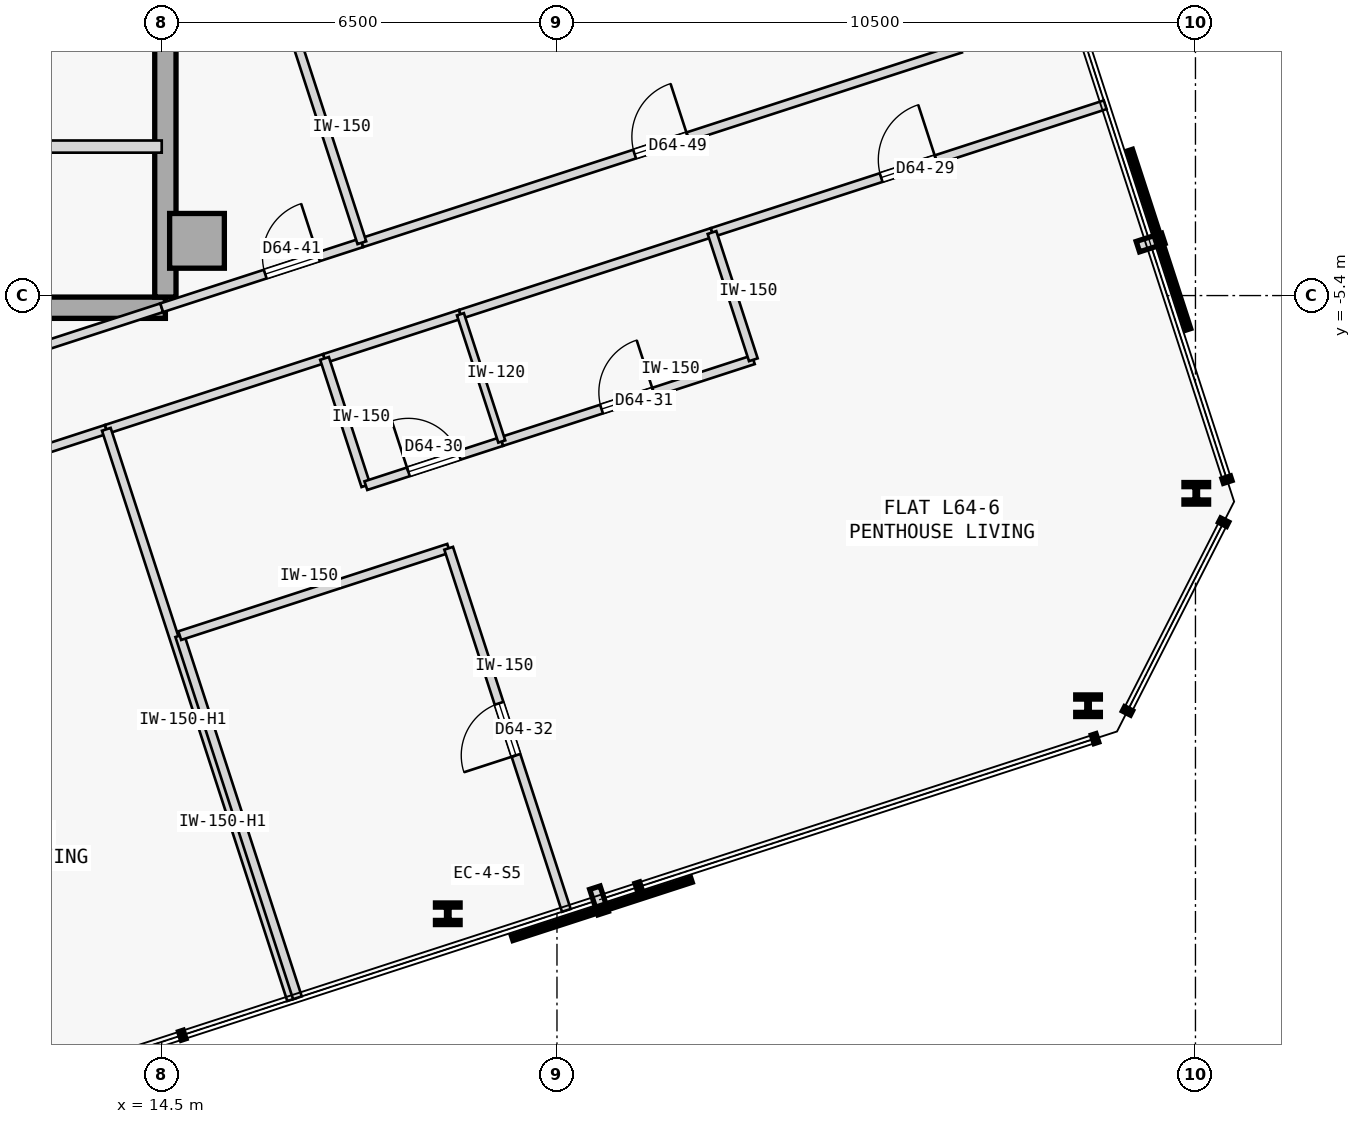
"""IFC4 building model, lengths in metres.
Left out: names, types, materials, properties, quantities, classifications, styles, units other than length and angle.
Written with IfcOpenShell. Run it as: python <this file> out.ifc"""

import sys

from ifc_helpers import new_model, si_unit, direction, frame, frame_2d, origin, origin_2d, place, context, subcontext, project, spatial, rectangle, i_section, extrude, element, fill, save


model = new_model("IFC4")
c1 = context("Model", 3, precision=1e-05, world=origin(), true_north=direction((0.0, 1.0)))
c2 = subcontext(c1, "Body", "Model", "MODEL_VIEW")
j1 = project(units=[si_unit("LENGTHUNIT", "METRE"), si_unit("PLANEANGLEUNIT", "RADIAN")], contexts=[c1])
p1 = place(None, origin())
s1 = spatial("IfcSite", under=j1, at=p1, CompositionType="ELEMENT")
p2 = place(p1, origin())
s2 = spatial("IfcBuilding", under=s1, at=p2, CompositionType="ELEMENT")
p3 = place(p2, frame((0.0, 0.0, 241.05)))
s3 = spatial("IfcBuildingStorey", under=s2, at=p3, CompositionType="ELEMENT", Elevation=241.05)
p4 = place(p3, frame((15.08, -4.5, 0.0), z_axis=(0.0, 0.0, 1.0), x_axis=(1.0, 0.0, 0.0)))
e1 = element("IfcColumn", 1, at=p4, inside=s3, PredefinedType="COLUMN", context=c2, shape_type="SweptSolid", body=[
    extrude(rectangle(XDim=0.9, YDim=0.9, at=origin_2d()), origin(), (0.0, 0.0, 1.0), 3.35),
])
p5 = place(p3, frame((3.7, -5.6, 0.0), z_axis=(0.0, 0.0, 1.0), x_axis=(1.0, 0.0, 0.0)))
e2 = element("IfcWall", 2, at=p5, inside=s3, PredefinedType="SHEAR", context=c2, shape_type="SweptSolid", body=[
    extrude(rectangle(XDim=10.86, YDim=0.35, at=frame_2d((5.43, 0.0))), origin(), (0.0, 0.0, 1.0), 3.125),
])
p6 = place(p3, frame((14.56, -5.425, 0.0), z_axis=(0.0, 0.0, 1.0), x_axis=(0.0, 1.0, 0.0)))
e3 = element("IfcWall", 3, at=p6, inside=s3, PredefinedType="SHEAR", context=c2, shape_type="SweptSolid", body=[
    extrude(rectangle(XDim=10.85, YDim=0.35, at=frame_2d((5.425, 0.0))), origin(), (0.0, 0.0, 1.0), 3.125),
])
for number, where, z_axis, x_axis in (
    (4, (19.204, -15.566, 0.0), (0.0, 0.0, 1.0), (1.0, 0.0, 0.0)),
    (5, (29.734, -12.145, 0.0), (0.0, 0.0, 1.0), (1.0, 0.0, 0.0)),
    (6, (31.513, -8.652, 0.0), (0.0, 0.0, 1.0), (1.0, 0.0, 0.0)),
):
    element("IfcColumn", number, at=place(p3, frame(where, z_axis=z_axis, x_axis=x_axis)), inside=s3, PredefinedType="COLUMN", context=c2, shape_type="SweptSolid", body=[
        extrude(i_section(OverallWidth=0.405, OverallDepth=0.355, WebThickness=0.042, FlangeThickness=0.068, FilletRadius=0.015, at=origin_2d()), origin(), (0.0, 0.0, 1.0), 3.35),
    ])
p7 = place(p3, frame((3.7, -2.95, 0.0), z_axis=(0.0, 0.0, 1.0), x_axis=(1.0, 0.0, 0.0)))
e7 = element("IfcWall", 7, at=p7, inside=s3, PredefinedType="STANDARD", context=c2, shape_type="SweptSolid", body=[
    extrude(rectangle(XDim=10.8, YDim=0.2, at=frame_2d((5.4, 0.0))), origin(), (0.0, 0.0, 1.0), 3.125),
])
p8 = place(p7, frame((0.53, 0.0, 0.0)))
e8 = element("IfcOpeningElement", 8, at=p8, cuts=e7, PredefinedType="OPENING", context=c2, shape_type="SweptSolid", body=[
    extrude(rectangle(XDim=1.1, YDim=2.15, at=frame_2d((0.55, 1.075))), frame((0.0, 0.11, 0.0), z_axis=(0.0, -1.0, 0.0), x_axis=(1.0, 0.0, 0.0)), (0.0, 0.0, 1.0), 0.22),
])
p9 = place(p7, frame((3.71, 0.0, 0.0)))
e9 = element("IfcOpeningElement", 9, at=p9, cuts=e7, PredefinedType="OPENING", context=c2, shape_type="SweptSolid", body=[
    extrude(rectangle(XDim=0.92, YDim=2.15, at=frame_2d((0.46, 1.075))), frame((0.0, 0.11, 0.0), z_axis=(0.0, -1.0, 0.0), x_axis=(1.0, 0.0, 0.0)), (0.0, 0.0, 1.0), 0.22),
])
p10 = place(p7, frame((8.03, 0.0, 0.0)))
e10 = element("IfcOpeningElement", 10, at=p10, cuts=e7, PredefinedType="OPENING", context=c2, shape_type="SweptSolid", body=[
    extrude(rectangle(XDim=0.92, YDim=2.15, at=frame_2d((0.46, 1.075))), frame((0.0, 0.11, 0.0), z_axis=(0.0, -1.0, 0.0), x_axis=(1.0, 0.0, 0.0)), (0.0, 0.0, 1.0), 0.22),
])
p11 = place(p3, frame((8.744, -9.174, 0.0), z_axis=(0.0, 0.0, 1.0), x_axis=(0.95105238152, 0.309029719615, 0.0)))
e11 = element("IfcWall", 11, at=p11, inside=s3, PredefinedType="PARTITIONING", context=c2, shape_type="SweptSolid", body=[
    extrude(rectangle(XDim=5.094, YDim=0.15, at=frame_2d((2.547, 0.0))), origin(), (0.0, 0.0, 1.0), 3.125),
])
p12 = place(p11, frame((2.072, 0.0, 0.0)))
e12 = element("IfcOpeningElement", 12, at=p12, cuts=e11, PredefinedType="OPENING", context=c2, shape_type="SweptSolid", body=[
    extrude(rectangle(XDim=0.95, YDim=2.15, at=frame_2d((0.475, 1.075))), frame((0.0, 0.085, 0.0), z_axis=(0.0, -1.0, 0.0), x_axis=(1.0, 0.0, 0.0)), (0.0, 0.0, 1.0), 0.17),
])
p13 = place(p3, frame((13.589, -7.6, 0.0), z_axis=(0.0, 0.0, 1.0), x_axis=(0.95105023481, 0.30903632613, 0.0)))
e13 = element("IfcWall", 13, at=p13, inside=s3, PredefinedType="PARTITIONING", context=c2, shape_type="SweptSolid", body=[
    extrude(rectangle(XDim=3.773, YDim=0.15, at=frame_2d((1.886, 0.0))), origin(), (0.0, 0.0, 1.0), 3.125),
])
p14 = place(p3, frame((23.549, -4.363, 0.0), z_axis=(0.0, 0.0, 1.0), x_axis=(0.951054649174, 0.309022740723, 0.0)))
e14 = element("IfcWall", 14, at=p14, inside=s3, PredefinedType="PARTITIONING", context=c2, shape_type="SweptSolid", body=[
    extrude(rectangle(XDim=6.799, YDim=0.15, at=frame_2d((3.399, 0.0))), origin(), (0.0, 0.0, 1.0), 3.125),
])
p15 = place(p14, frame((2.925, 0.0, 0.0)))
e15 = element("IfcOpeningElement", 15, at=p15, cuts=e14, PredefinedType="OPENING", context=c2, shape_type="SweptSolid", body=[
    extrude(rectangle(XDim=0.95, YDim=2.15, at=frame_2d((0.475, 1.075))), frame((0.0, 0.085, 0.0), z_axis=(0.0, -1.0, 0.0), x_axis=(1.0, 0.0, 0.0)), (0.0, 0.0, 1.0), 0.17),
])
p16 = place(p3, frame((17.177, -6.434, 0.0), z_axis=(0.0, 0.0, 1.0), x_axis=(0.951066131077, 0.308987401554, 0.0)))
e16 = element("IfcWall", 16, at=p16, inside=s3, PredefinedType="PARTITIONING", context=c2, shape_type="SweptSolid", body=[
    extrude(rectangle(XDim=2.35, YDim=0.15, at=frame_2d((1.175, 0.0))), origin(), (0.0, 0.0, 1.0), 3.125),
])
p17 = place(p3, frame((19.412, -5.708, 0.0), z_axis=(0.0, 0.0, 1.0), x_axis=(0.951057987102, 0.309012467661, 0.0)))
e17 = element("IfcWall", 17, at=p17, inside=s3, PredefinedType="PARTITIONING", context=c2, shape_type="SweptSolid", body=[
    extrude(rectangle(XDim=4.35, YDim=0.15, at=frame_2d((2.175, 0.0))), origin(), (0.0, 0.0, 1.0), 3.125),
])
p18 = place(p3, frame((7.588, -7.846, 0.0), z_axis=(0.0, 0.0, 1.0), x_axis=(0.951058013903, 0.309012385174, 0.0)))
e18 = element("IfcWall", 18, at=p18, inside=s3, PredefinedType="PARTITIONING", context=c2, shape_type="SweptSolid", body=[
    extrude(rectangle(XDim=7.267, YDim=0.15, at=frame_2d((3.634, 0.0))), origin(), (0.0, 0.0, 1.0), 3.125),
])
p19 = place(p18, frame((0.557, 0.0, 0.0)))
e19 = element("IfcOpeningElement", 19, at=p19, cuts=e18, PredefinedType="OPENING", context=c2, shape_type="SweptSolid", body=[
    extrude(rectangle(XDim=0.92, YDim=2.15, at=frame_2d((0.46, 1.075))), frame((0.0, 0.085, 0.0), z_axis=(0.0, -1.0, 0.0), x_axis=(1.0, 0.0, 0.0)), (0.0, 0.0, 1.0), 0.17),
])
p20 = place(p3, frame((14.5, -5.6, 0.0), z_axis=(0.0, 0.0, 1.0), x_axis=(0.951047546178, 0.309044600193, 0.0)))
e20 = element("IfcWall", 20, at=p20, inside=s3, PredefinedType="PARTITIONING", context=c2, shape_type="SweptSolid", body=[
    extrude(rectangle(XDim=3.461, YDim=0.15, at=frame_2d((1.73, 0.0))), origin(), (0.0, 0.0, 1.0), 3.125),
])
p21 = place(p20, frame((1.79, 0.0, 0.0)))
e21 = element("IfcOpeningElement", 21, at=p21, cuts=e20, PredefinedType="OPENING", context=c2, shape_type="SweptSolid", body=[
    extrude(rectangle(XDim=0.92, YDim=2.15, at=frame_2d((0.46, 1.075))), frame((0.0, 0.085, 0.0), z_axis=(0.0, -1.0, 0.0), x_axis=(1.0, 0.0, 0.0)), (0.0, 0.0, 1.0), 0.17),
])
p22 = place(p3, frame((17.791, -4.531, 0.0), z_axis=(0.0, 0.0, 1.0), x_axis=(0.951056769902, 0.309016213852, 0.0)))
e22 = element("IfcWall", 22, at=p22, inside=s3, PredefinedType="PARTITIONING", context=c2, shape_type="SweptSolid", body=[
    extrude(rectangle(XDim=10.352, YDim=0.15, at=frame_2d((5.176, 0.0))), origin(), (0.0, 0.0, 1.0), 3.125),
])
p23 = place(p22, frame((4.716, 0.0, 0.0)))
e23 = element("IfcOpeningElement", 23, at=p23, cuts=e22, PredefinedType="OPENING", context=c2, shape_type="SweptSolid", body=[
    extrude(rectangle(XDim=0.92, YDim=2.15, at=frame_2d((0.46, 1.075))), frame((0.0, 0.085, 0.0), z_axis=(0.0, -1.0, 0.0), x_axis=(1.0, 0.0, 0.0)), (0.0, 0.0, 1.0), 0.17),
])
p24 = place(p3, frame((16.636, -16.979, 0.0), z_axis=(0.0, 0.0, 1.0), x_axis=(-0.309022258842, 0.95105480575, 0.0)))
e24 = element("IfcWall", 24, at=p24, inside=s3, PredefinedType="PARTITIONING", context=c2, shape_type="SweptSolid", body=[
    extrude(rectangle(XDim=9.862, YDim=0.15, at=frame_2d((4.931, 0.0))), origin(), (0.0, 0.0, 1.0), 2.675),
])
p25 = place(p3, frame((17.857, -8.526, 0.0), z_axis=(0.0, 0.0, 1.0), x_axis=(-0.309060979314, 0.951042223598, 0.0)))
e25 = element("IfcWall", 25, at=p25, inside=s3, PredefinedType="PARTITIONING", context=c2, shape_type="SweptSolid", body=[
    extrude(rectangle(XDim=2.2, YDim=0.15, at=frame_2d((1.1, 0.0))), origin(), (0.0, 0.0, 1.0), 3.125),
])
p26 = place(p3, frame((17.857, -8.526, 0.0), z_axis=(0.0, 0.0, 1.0), x_axis=(0.951066131077, 0.308987401554, 0.0)))
e26 = element("IfcWall", 26, at=p26, inside=s3, PredefinedType="PARTITIONING", context=c2, shape_type="SweptSolid", body=[
    extrude(rectangle(XDim=2.35, YDim=0.15, at=frame_2d((1.175, 0.0))), origin(), (0.0, 0.0, 1.0), 3.125),
])
p27 = place(p26, frame((0.735, 0.0, 0.0)))
e27 = element("IfcOpeningElement", 27, at=p27, cuts=e26, PredefinedType="OPENING", context=c2, shape_type="SweptSolid", body=[
    extrude(rectangle(XDim=0.88, YDim=2.15, at=frame_2d((0.44, 1.075))), frame((0.0, 0.085, 0.0), z_axis=(0.0, -1.0, 0.0), x_axis=(1.0, 0.0, 0.0)), (0.0, 0.0, 1.0), 0.17),
])
p28 = place(p3, frame((20.092, -7.8, 0.0), z_axis=(0.0, 0.0, 1.0), x_axis=(0.951057987102, 0.309012467661, 0.0)))
e28 = element("IfcWall", 28, at=p28, inside=s3, PredefinedType="PARTITIONING", context=c2, shape_type="SweptSolid", body=[
    extrude(rectangle(XDim=4.35, YDim=0.15, at=frame_2d((2.175, 0.0))), origin(), (0.0, 0.0, 1.0), 3.125),
])
p29 = place(p28, frame((1.725, 0.0, 0.0)))
e29 = element("IfcOpeningElement", 29, at=p29, cuts=e28, PredefinedType="OPENING", context=c2, shape_type="SweptSolid", body=[
    extrude(rectangle(XDim=0.9, YDim=2.15, at=frame_2d((0.45, 1.075))), frame((0.0, 0.085, 0.0), z_axis=(0.0, -1.0, 0.0), x_axis=(1.0, 0.0, 0.0)), (0.0, 0.0, 1.0), 0.17),
])
p30 = place(p3, frame((24.229, -6.456, 0.0), z_axis=(0.0, 0.0, 1.0), x_axis=(-0.309060979314, 0.951042223598, 0.0)))
e30 = element("IfcWall", 30, at=p30, inside=s3, PredefinedType="PARTITIONING", context=c2, shape_type="SweptSolid", body=[
    extrude(rectangle(XDim=2.2, YDim=0.15, at=frame_2d((1.1, 0.0))), origin(), (0.0, 0.0, 1.0), 3.125),
])
p31 = place(p3, frame((16.731, -16.948, 0.0), z_axis=(0.0, 0.0, 1.0), x_axis=(-0.309013782848, 0.951057559777, 0.0)))
e31 = element("IfcWall", 31, at=p31, inside=s3, PredefinedType="PARTITIONING", context=c2, shape_type="SweptSolid", body=[
    extrude(rectangle(XDim=6.262, YDim=0.15, at=frame_2d((3.131, 0.0))), origin(), (0.0, 0.0, 1.0), 2.675),
])
p32 = place(p3, frame((14.796, -10.992, 0.0), z_axis=(0.0, 0.0, 1.0), x_axis=(0.951070715387, 0.308973290646, 0.0)))
e32 = element("IfcWall", 32, at=p32, inside=s3, PredefinedType="PARTITIONING", context=c2, shape_type="SweptSolid", body=[
    extrude(rectangle(XDim=4.65, YDim=0.15, at=frame_2d((2.325, 0.0))), origin(), (0.0, 0.0, 1.0), 3.125),
])
p33 = place(p3, frame((21.154, -15.511, 0.0), z_axis=(0.0, 0.0, 1.0), x_axis=(-0.30902524124, 0.951053836687, 0.0)))
e33 = element("IfcWall", 33, at=p33, inside=s3, PredefinedType="PARTITIONING", context=c2, shape_type="SweptSolid", body=[
    extrude(rectangle(XDim=6.262, YDim=0.15, at=frame_2d((3.131, 0.0))), origin(), (0.0, 0.0, 1.0), 3.125),
])
p34 = place(p33, frame((2.681, 0.0, 0.0)))
e34 = element("IfcOpeningElement", 34, at=p34, cuts=e33, PredefinedType="OPENING", context=c2, shape_type="SweptSolid", body=[
    extrude(rectangle(XDim=0.9, YDim=2.15, at=frame_2d((0.45, 1.075))), frame((0.0, 0.085, 0.0), z_axis=(0.0, -1.0, 0.0), x_axis=(1.0, 0.0, 0.0)), (0.0, 0.0, 1.0), 0.17),
])
p35 = place(p3, frame((20.092, -7.8, 0.0), z_axis=(0.0, 0.0, 1.0), x_axis=(-0.309060979314, 0.951042223598, 0.0)))
e35 = element("IfcWall", 35, at=p35, inside=s3, PredefinedType="PARTITIONING", context=c2, shape_type="SweptSolid", body=[
    extrude(rectangle(XDim=2.2, YDim=0.12, at=frame_2d((1.1, 0.0))), origin(), (0.0, 0.0, 1.0), 3.125),
])
p36 = place(p3, frame((17.791, -4.531, 0.0), z_axis=(0.0, 0.0, 1.0), x_axis=(-0.309018414265, 0.951056054944, 0.0)))
e36 = element("IfcWall", 36, at=p36, inside=s3, PredefinedType="PARTITIONING", context=c2, shape_type="SweptSolid", body=[
    extrude(rectangle(XDim=3.835, YDim=0.15, at=frame_2d((1.917, 0.0))), origin(), (0.0, 0.0, 1.0), 3.125),
])
p37 = place(p15, origin())
e37 = element("IfcDoor", 37, at=p37, inside=s3, OperationType="SINGLE_SWING_RIGHT", PredefinedType="DOOR", context=c2, shape_type="SweptSolid", body=[
    extrude(rectangle(XDim=0.95, YDim=2.15, at=frame_2d((0.475, 1.075))), frame((0.0, 0.025, 0.0), z_axis=(0.0, -1.0, 0.0), x_axis=(1.0, 0.0, 0.0)), (0.0, 0.0, 1.0), 0.05),
])
fill(e15, e37)
p38 = place(p27, origin())
e38 = element("IfcDoor", 38, at=p38, inside=s3, OperationType="SINGLE_SWING_LEFT", PredefinedType="DOOR", context=c2, shape_type="SweptSolid", body=[
    extrude(rectangle(XDim=0.88, YDim=2.15, at=frame_2d((0.44, 1.075))), frame((0.0, 0.025, 0.0), z_axis=(0.0, -1.0, 0.0), x_axis=(1.0, 0.0, 0.0)), (0.0, 0.0, 1.0), 0.05),
])
fill(e27, e38)
p39 = place(p29, origin())
e39 = element("IfcDoor", 39, at=p39, inside=s3, OperationType="SINGLE_SWING_RIGHT", PredefinedType="DOOR", context=c2, shape_type="SweptSolid", body=[
    extrude(rectangle(XDim=0.9, YDim=2.15, at=frame_2d((0.45, 1.075))), frame((0.0, 0.025, 0.0), z_axis=(0.0, -1.0, 0.0), x_axis=(1.0, 0.0, 0.0)), (0.0, 0.0, 1.0), 0.05),
])
fill(e29, e39)
p40 = place(p34, origin())
e40 = element("IfcDoor", 40, at=p40, inside=s3, OperationType="SINGLE_SWING_LEFT", PredefinedType="DOOR", context=c2, shape_type="SweptSolid", body=[
    extrude(rectangle(XDim=0.9, YDim=2.15, at=frame_2d((0.45, 1.075))), frame((0.0, 0.025, 0.0), z_axis=(0.0, -1.0, 0.0), x_axis=(1.0, 0.0, 0.0)), (0.0, 0.0, 1.0), 0.05),
])
fill(e34, e40)
p41 = place(p21, origin())
e41 = element("IfcDoor", 41, at=p41, inside=s3, OperationType="SINGLE_SWING_RIGHT", PredefinedType="DOOR", context=c2, shape_type="SweptSolid", body=[
    extrude(rectangle(XDim=0.92, YDim=2.15, at=frame_2d((0.46, 1.075))), frame((0.0, 0.025, 0.0), z_axis=(0.0, -1.0, 0.0), x_axis=(1.0, 0.0, 0.0)), (0.0, 0.0, 1.0), 0.05),
])
fill(e21, e41)
p42 = place(p23, origin())
e42 = element("IfcDoor", 42, at=p42, inside=s3, OperationType="SINGLE_SWING_RIGHT", PredefinedType="DOOR", context=c2, shape_type="SweptSolid", body=[
    extrude(rectangle(XDim=0.92, YDim=2.15, at=frame_2d((0.46, 1.075))), frame((0.0, 0.025, 0.0), z_axis=(0.0, -1.0, 0.0), x_axis=(1.0, 0.0, 0.0)), (0.0, 0.0, 1.0), 0.05),
])
fill(e23, e42)
save(model, sys.argv[1])
